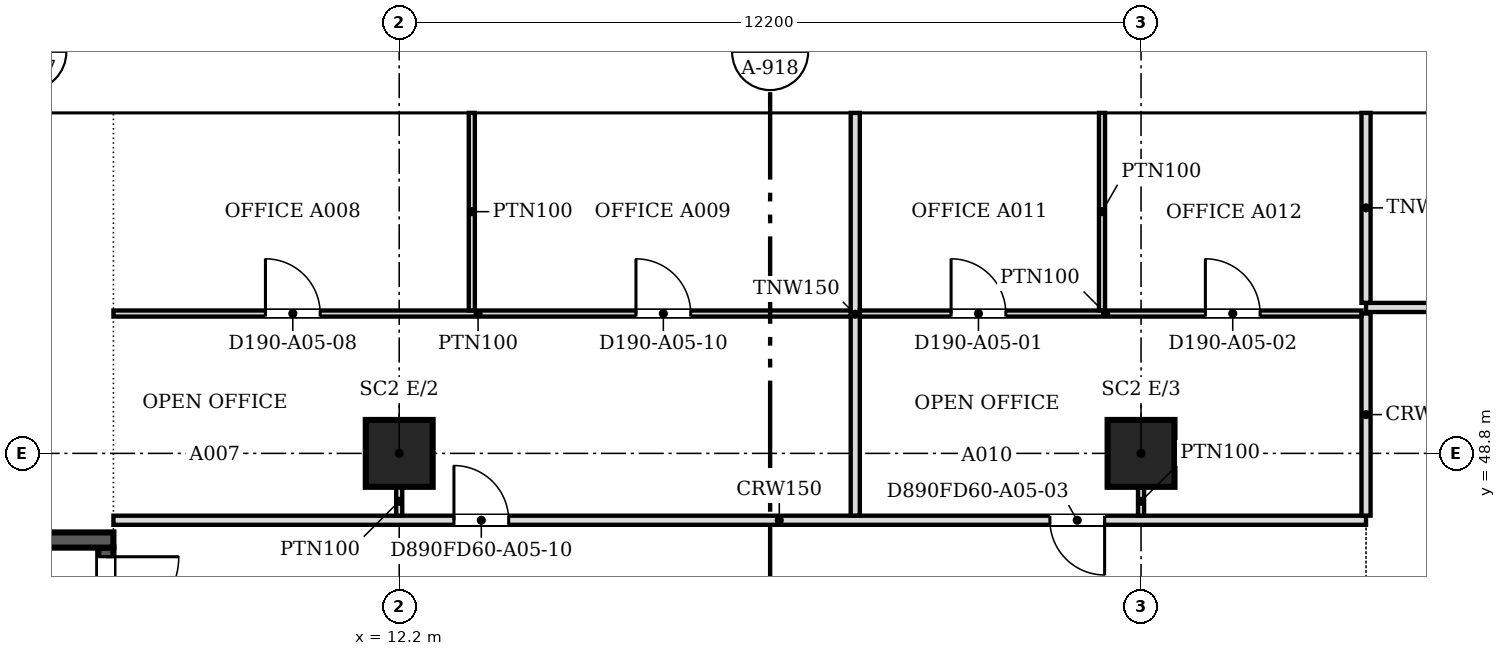
"""IFC4 building model, lengths in metres.
Left out: names, types, materials, properties, quantities, classifications, styles, units other than length and angle.
Written with IfcOpenShell. Run it as: python <this file> out.ifc"""

import sys

from ifc_helpers import new_model, si_unit, direction, frame, frame_2d, origin, origin_2d, place, context, subcontext, project, spatial, polyline, rectangle, outline, extrude, faceted_brep, source, transform, mapped, element, fill, save


model = new_model("IFC4")
c1 = context("Model", 3, precision=1e-05, world=origin(), true_north=direction((0.0, 1.0)))
c2 = subcontext(c1, "Body", "Model", "MODEL_VIEW")
j1 = project(units=[si_unit("LENGTHUNIT", "METRE"), si_unit("PLANEANGLEUNIT", "RADIAN")], contexts=[c1])
p1 = place(None, origin())
s1 = spatial("IfcSite", under=j1, at=p1, CompositionType="ELEMENT")
p2 = place(p1, origin())
s2 = spatial("IfcBuilding", under=s1, at=p2, CompositionType="ELEMENT")
p3 = place(p2, frame((0.0, 0.0, 56.2)))
s3 = spatial("IfcBuildingStorey", under=s2, at=p3, CompositionType="ELEMENT", Elevation=56.2)
for number, where, z_axis, x_axis in (
    (1, (12.2, 48.8, 0.0), (0.0, 0.0, 1.0), (1.0, 0.0, 0.0)),
    (2, (24.4, 48.8, 0.0), (0.0, 0.0, 1.0), (1.0, 0.0, 0.0)),
):
    element("IfcColumn", number, at=place(p3, frame(where, z_axis=z_axis, x_axis=x_axis)), inside=s3, PredefinedType="COLUMN", context=c2, shape_type="SweptSolid", body=[
        extrude(rectangle(XDim=1.1, YDim=1.1, at=origin_2d()), origin(), (0.0, 0.0, 1.0), 3.6),
    ])
m1 = source(origin(), c2, "Body", "SweptSolid", [
    extrude(outline(polyline([(3.05, 0.0), (6.1, 3.8), (3.05, 7.6), (0.0, 3.8), (3.05, 0.0)])), frame((0.0, 0.25, 0.0), z_axis=(0.0, -1.0, 0.0), x_axis=(1.0, 0.0, 0.0)), (0.0, 0.0, 1.0), 0.5),
])
p4 = place(p3, frame((33.55, 54.65, -3.8), z_axis=(0.0, 0.0, 1.0), x_axis=(-1.0, 0.0, 0.0)))
e3 = element("IfcWall", 3, at=p4, inside=s3, PredefinedType="SOLIDWALL", context=c2, shape_type="MappedRepresentation", body=[
    mapped(m1, transform((0.0, 0.0, 0.0), scale=1.0)),
])
m2 = source(origin(), c2, "Body", "SweptSolid", [
    extrude(outline(polyline([(3.05, 0.399), (5.78, 3.8), (3.05, 7.201), (0.321, 3.8), (3.05, 0.399)])), frame((0.0, 0.26, 0.0), z_axis=(0.0, -1.0, 0.0), x_axis=(1.0, 0.0, 0.0)), (0.0, 0.0, 1.0), 0.52),
])
p5 = place(p4, origin())
e4 = element("IfcOpeningElement", 4, at=p5, cuts=e3, PredefinedType="OPENING", context=c2, shape_type="MappedRepresentation", body=[
    mapped(m2, transform((0.0, 0.0, 0.0), scale=1.0)),
])
m3 = source(origin(), c2, "Body", "Brep", [
    faceted_brep([(3.05, -0.25, 0.0), (6.1, -0.25, 3.8), (6.1, -0.25, 3.8), (3.05, -0.25, 7.6), (0.0, -0.25, 3.8), (0.0, 0.25, 3.8), (3.05, 0.25, 7.6), (6.1, 0.25, 3.8), (6.1, 0.25, 3.8), (3.05, 0.25, 0.0)], [[[0, 1, 2, 3, 4]], [[5, 6, 7, 8, 9]], [[9, 8, 1, 0]], [[7, 6, 3, 2]], [[6, 5, 4, 3]], [[5, 9, 0, 4]], [[1, 8, 7, 2]]]),
])
p6 = place(p3, frame((27.45, 54.65, -3.8), z_axis=(0.0, 0.0, 1.0), x_axis=(-1.0, 0.0, 0.0)))
e5 = element("IfcWall", 5, at=p6, inside=s3, PredefinedType="SOLIDWALL", context=c2, shape_type="MappedRepresentation", body=[
    mapped(m3, transform((0.0, 0.0, 0.0), scale=1.0)),
])
p7 = place(p6, origin())
e6 = element("IfcOpeningElement", 6, at=p7, cuts=e5, PredefinedType="OPENING", context=c2, shape_type="MappedRepresentation", body=[
    mapped(m2, transform((0.0, 0.0, 0.0), scale=1.0)),
])
p8 = place(p3, frame((21.35, 54.65, -3.8), z_axis=(0.0, 0.0, 1.0), x_axis=(-1.0, 0.0, 0.0)))
e7 = element("IfcWall", 7, at=p8, inside=s3, PredefinedType="SOLIDWALL", context=c2, shape_type="MappedRepresentation", body=[
    mapped(m1, transform((0.0, 0.0, 0.0), scale=1.0)),
])
p9 = place(p8, origin())
e8 = element("IfcOpeningElement", 8, at=p9, cuts=e7, PredefinedType="OPENING", context=c2, shape_type="MappedRepresentation", body=[
    mapped(m2, transform((0.0, 0.0, 0.0), scale=1.0)),
])
p10 = place(p3, frame((15.25, 54.65, -3.8), z_axis=(0.0, 0.0, 1.0), x_axis=(-1.0, 0.0, 0.0)))
e9 = element("IfcWall", 9, at=p10, inside=s3, PredefinedType="SOLIDWALL", context=c2, shape_type="MappedRepresentation", body=[
    mapped(m1, transform((0.0, 0.0, 0.0), scale=1.0)),
])
p11 = place(p10, origin())
e10 = element("IfcOpeningElement", 10, at=p11, cuts=e9, PredefinedType="OPENING", context=c2, shape_type="MappedRepresentation", body=[
    mapped(m2, transform((0.0, 0.0, 0.0), scale=1.0)),
])
m4 = source(origin(), c2, "Body", "Brep", [
    faceted_brep([(3.003, -0.25, 0.0), (3.05, -0.25, 0.06), (3.05, -0.25, 7.54), (3.003, -0.25, 7.6), (0.0, -0.25, 3.8), (0.0, 0.25, 3.8), (2.957, 0.25, 7.541), (2.957, 0.25, 0.059), (3.003, 0.0, 0.0), (3.003, 0.0, 7.6)], [[[0, 1, 2, 3, 4]], [[5, 6, 7]], [[1, 0, 8]], [[9, 3, 2]], [[6, 5, 4, 3, 9]], [[5, 7, 8, 0, 4]], [[1, 8, 7, 6, 9, 2]]]),
])
p12 = place(p3, frame((9.15, 54.65, -3.8), z_axis=(0.0, 0.0, 1.0), x_axis=(-1.0, 0.0, 0.0)))
e11 = element("IfcWall", 11, at=p12, inside=s3, PredefinedType="SOLIDWALL", context=c2, shape_type="MappedRepresentation", body=[
    mapped(m4, transform((0.0, 0.0, 0.0), scale=1.0)),
])
m5 = source(origin(), c2, "Body", "SweptSolid", [
    extrude(outline(polyline([(2.803, 6.944), (0.319, 3.8), (2.803, 0.656), (2.803, 6.944)])), frame((0.0, 0.26, 0.0), z_axis=(0.0, -1.0, 0.0), x_axis=(1.0, 0.0, 0.0)), (0.0, 0.0, 1.0), 0.52),
])
p13 = place(p12, origin())
e12 = element("IfcOpeningElement", 12, at=p13, cuts=e11, PredefinedType="OPENING", context=c2, shape_type="MappedRepresentation", body=[
    mapped(m5, transform((0.0, 0.0, 0.0), scale=1.0)),
])
p14 = place(p2, frame((0.0, 0.0, 60.0)))
s4 = spatial("IfcBuildingStorey", under=s2, at=p14, CompositionType="ELEMENT", Elevation=60.0)
p15 = place(p14, frame((30.5, 54.65, -3.8), z_axis=(0.0, 0.0, 1.0), x_axis=(-1.0, 0.0, 0.0)))
e13 = element("IfcWall", 13, at=p15, inside=s4, PredefinedType="SOLIDWALL", context=c2, shape_type="MappedRepresentation", body=[
    mapped(m1, transform((0.0, 0.0, 0.0), scale=1.0)),
])
p16 = place(p15, origin())
e14 = element("IfcOpeningElement", 14, at=p16, cuts=e13, PredefinedType="OPENING", context=c2, shape_type="MappedRepresentation", body=[
    mapped(m2, transform((0.0, 0.0, 0.0), scale=1.0)),
])
p17 = place(p14, frame((24.4, 54.65, -3.8), z_axis=(0.0, 0.0, 1.0), x_axis=(-1.0, 0.0, 0.0)))
e15 = element("IfcWall", 15, at=p17, inside=s4, PredefinedType="SOLIDWALL", context=c2, shape_type="MappedRepresentation", body=[
    mapped(m3, transform((0.0, 0.0, 0.0), scale=1.0)),
])
p18 = place(p17, origin())
e16 = element("IfcOpeningElement", 16, at=p18, cuts=e15, PredefinedType="OPENING", context=c2, shape_type="MappedRepresentation", body=[
    mapped(m2, transform((0.0, 0.0, 0.0), scale=1.0)),
])
p19 = place(p14, frame((18.3, 54.65, -3.8), z_axis=(0.0, 0.0, 1.0), x_axis=(-1.0, 0.0, 0.0)))
e17 = element("IfcWall", 17, at=p19, inside=s4, PredefinedType="SOLIDWALL", context=c2, shape_type="MappedRepresentation", body=[
    mapped(m1, transform((0.0, 0.0, 0.0), scale=1.0)),
])
p20 = place(p19, origin())
e18 = element("IfcOpeningElement", 18, at=p20, cuts=e17, PredefinedType="OPENING", context=c2, shape_type="MappedRepresentation", body=[
    mapped(m2, transform((0.0, 0.0, 0.0), scale=1.0)),
])
m6 = source(origin(), c2, "Body", "Brep", [
    faceted_brep([(3.05, -0.25, 0.0), (6.053, -0.25, 3.8), (3.05, -0.25, 7.6), (0.0, -0.25, 3.8), (0.0, 0.25, 3.8), (3.05, 0.25, 7.6), (6.007, 0.25, 3.859), (6.007, 0.25, 3.741), (3.05, 0.25, 0.0), (6.053, 0.0, 3.8)], [[[0, 1, 2, 3]], [[4, 5, 6, 7, 8]], [[8, 7, 9, 1, 0]], [[6, 5, 2, 1, 9]], [[5, 4, 3, 2]], [[4, 8, 0, 3]], [[9, 7, 6]]]),
])
p21 = place(p14, frame((12.2, 54.65, -3.8), z_axis=(0.0, 0.0, 1.0), x_axis=(-1.0, 0.0, 0.0)))
e19 = element("IfcWall", 19, at=p21, inside=s4, PredefinedType="SOLIDWALL", context=c2, shape_type="MappedRepresentation", body=[
    mapped(m6, transform((0.0, 0.0, 0.0), scale=1.0)),
])
m7 = source(origin(), c2, "Body", "SweptSolid", [
    extrude(outline(polyline([(3.049, 0.401), (5.735, 3.8), (3.049, 7.199), (0.321, 3.8), (3.049, 0.401)])), frame((0.0, 0.26, 0.0), z_axis=(0.0, -1.0, 0.0), x_axis=(1.0, 0.0, 0.0)), (0.0, 0.0, 1.0), 0.52),
])
p22 = place(p21, origin())
e20 = element("IfcOpeningElement", 20, at=p22, cuts=e19, PredefinedType="OPENING", context=c2, shape_type="MappedRepresentation", body=[
    mapped(m7, transform((0.0, 0.0, 0.0), scale=1.0)),
])
p23 = place(p3, frame((3.6, 47.375, 0.0), z_axis=(0.0, 0.0, 1.0), x_axis=(1.0, 0.0, 0.0)))
e21 = element("IfcWall", 21, at=p23, inside=s3, PredefinedType="SOLIDWALL", context=c2, shape_type="SweptSolid", body=[
    extrude(rectangle(XDim=3.9, YDim=0.25, at=frame_2d((1.95, 0.0))), origin(), (0.0, 0.0, 1.0), 3.8),
])
p24 = place(p3, frame((7.375, 47.25, 0.0), z_axis=(0.0, 0.0, 1.0), x_axis=(0.0, -1.0, 0.0)))
e22 = element("IfcWall", 22, at=p24, inside=s3, PredefinedType="SOLIDWALL", context=c2, shape_type="SweptSolid", body=[
    extrude(rectangle(XDim=8.0, YDim=0.25, at=frame_2d((4.0, 0.0))), origin(), (0.0, 0.0, 1.0), 3.8),
])
m8 = source(origin(), c2, "Body", "SweptSolid", [
    extrude(rectangle(XDim=1.2, YDim=2.1, at=frame_2d((0.6, 1.05))), frame((0.0, 0.135, 0.0), z_axis=(0.0, -1.0, 0.0), x_axis=(1.0, 0.0, 0.0)), (0.0, 0.0, 1.0), 0.27),
])
p25 = place(p24, frame((0.15, 0.0, 0.0)))
e23 = element("IfcOpeningElement", 23, at=p25, cuts=e22, PredefinedType="OPENING", context=c2, shape_type="MappedRepresentation", body=[
    mapped(m8, transform((0.0, 0.0, 0.0), scale=1.0)),
])
p26 = place(p3, frame((7.5, 47.7, 0.0), z_axis=(0.0, 0.0, 1.0), x_axis=(1.0, 0.0, 0.0)))
e24 = element("IfcWall", 24, at=p26, inside=s3, PredefinedType="PARTITIONING", context=c2, shape_type="SweptSolid", body=[
    extrude(rectangle(XDim=20.6, YDim=0.15, at=frame_2d((10.3, 0.0))), origin(), (0.0, 0.0, 1.0), 3.067),
])
m9 = source(origin(), c2, "Body", "SweptSolid", [
    extrude(rectangle(XDim=0.9, YDim=2.1, at=frame_2d((0.45, 1.05))), frame((0.0, 0.085, 0.0), z_axis=(0.0, -1.0, 0.0), x_axis=(1.0, 0.0, 0.0)), (0.0, 0.0, 1.0), 0.17),
])
p27 = place(p26, frame((15.401, 0.0, 0.0)))
e25 = element("IfcOpeningElement", 25, at=p27, cuts=e24, PredefinedType="OPENING", context=c2, shape_type="MappedRepresentation", body=[
    mapped(m9, transform((0.0, 0.0, 0.0), scale=1.0)),
])
p28 = place(p26, frame((5.6, 0.0, 0.0)))
e26 = element("IfcOpeningElement", 26, at=p28, cuts=e24, PredefinedType="OPENING", context=c2, shape_type="MappedRepresentation", body=[
    mapped(m9, transform((0.0, 0.0, 0.0), scale=1.0)),
])
p29 = place(p3, frame((19.7, 47.776, 0.0), z_axis=(0.0, 0.0, 1.0), x_axis=(0.0, 1.0, 0.0)))
e27 = element("IfcWall", 27, at=p29, inside=s3, PredefinedType="PARTITIONING", context=c2, shape_type="SweptSolid", body=[
    extrude(rectangle(XDim=6.624, YDim=0.15, at=frame_2d((3.312, 0.0))), origin(), (0.0, 0.0, 1.0), 3.067),
])
p30 = place(p3, frame((28.1, 47.776, 0.0), z_axis=(0.0, 0.0, 1.0), x_axis=(0.0, 1.0, 0.0)))
e28 = element("IfcWall", 28, at=p30, inside=s3, PredefinedType="PARTITIONING", context=c2, shape_type="SweptSolid", body=[
    extrude(rectangle(XDim=3.324, YDim=0.15, at=frame_2d((1.662, 0.0))), origin(), (0.0, 0.0, 1.0), 3.067),
])
for number, where, z_axis, x_axis in (
    (29, (12.2, 48.25, 0.0), (0.0, 0.0, 1.0), (0.0, -1.0, 0.0)),
    (30, (24.4, 48.25, 0.0), (0.0, 0.0, 1.0), (0.0, -1.0, 0.0)),
):
    element("IfcWall", number, at=place(p3, frame(where, z_axis=z_axis, x_axis=x_axis)), inside=s3, PredefinedType="PARTITIONING", context=c2, shape_type="SweptSolid", body=[
        extrude(rectangle(XDim=0.475, YDim=0.1, at=frame_2d((0.238, 0.0))), origin(), (0.0, 0.0, 1.0), 3.067),
    ])
p31 = place(p3, frame((7.5, 51.1, 0.0), z_axis=(0.0, 0.0, 1.0), x_axis=(1.0, 0.0, 0.0)))
e31 = element("IfcWall", 31, at=p31, inside=s3, PredefinedType="PARTITIONING", context=c2, shape_type="SweptSolid", body=[
    extrude(rectangle(XDim=12.124, YDim=0.1, at=frame_2d((6.062, 0.0))), origin(), (0.0, 0.0, 1.0), 3.067),
])
m10 = source(origin(), c2, "Body", "SweptSolid", [
    extrude(rectangle(XDim=0.9, YDim=2.1, at=frame_2d((0.45, 1.05))), frame((0.0, 0.06, 0.0), z_axis=(0.0, -1.0, 0.0), x_axis=(1.0, 0.0, 0.0)), (0.0, 0.0, 1.0), 0.12),
])
p32 = place(p31, frame((2.5, 0.0, 0.0)))
e32 = element("IfcOpeningElement", 32, at=p32, cuts=e31, PredefinedType="OPENING", context=c2, shape_type="MappedRepresentation", body=[
    mapped(m10, transform((0.0, 0.0, 0.0), scale=1.0)),
])
p33 = place(p31, frame((8.594, 0.0, 0.0)))
e33 = element("IfcOpeningElement", 33, at=p33, cuts=e31, PredefinedType="OPENING", context=c2, shape_type="MappedRepresentation", body=[
    mapped(m10, transform((0.0, 0.0, 0.0), scale=1.0)),
])
p34 = place(p3, frame((19.776, 51.1, 0.0), z_axis=(0.0, 0.0, 1.0), x_axis=(1.0, 0.0, 0.0)))
e34 = element("IfcWall", 34, at=p34, inside=s3, PredefinedType="PARTITIONING", context=c2, shape_type="SweptSolid", body=[
    extrude(rectangle(XDim=8.248, YDim=0.1, at=frame_2d((4.124, 0.0))), origin(), (0.0, 0.0, 1.0), 3.067),
])
p35 = place(p34, frame((1.5, 0.0, 0.0)))
e35 = element("IfcOpeningElement", 35, at=p35, cuts=e34, PredefinedType="OPENING", context=c2, shape_type="MappedRepresentation", body=[
    mapped(m10, transform((0.0, 0.0, 0.0), scale=1.0)),
])
p36 = place(p34, frame((5.682, 0.0, 0.0)))
e36 = element("IfcOpeningElement", 36, at=p36, cuts=e34, PredefinedType="OPENING", context=c2, shape_type="MappedRepresentation", body=[
    mapped(m10, transform((0.0, 0.0, 0.0), scale=1.0)),
])
for number, where, z_axis, x_axis in (
    (37, (13.394, 51.151, 0.0), (0.0, 0.0, 1.0), (0.0, 1.0, 0.0)),
    (38, (23.758, 51.151, 0.0), (0.0, 0.0, 1.0), (0.0, 1.0, 0.0)),
):
    element("IfcWall", number, at=place(p3, frame(where, z_axis=z_axis, x_axis=x_axis)), inside=s3, PredefinedType="PARTITIONING", context=c2, shape_type="SweptSolid", body=[
        extrude(rectangle(XDim=3.249, YDim=0.1, at=frame_2d((1.625, 0.0))), origin(), (0.0, 0.0, 1.0), 3.067),
    ])
p37 = place(p3, frame((28.1, 51.2, 0.0), z_axis=(0.0, 0.0, 1.0), x_axis=(1.0, 0.0, 0.0)))
e39 = element("IfcWall", 39, at=p37, inside=s3, PredefinedType="PARTITIONING", context=c2, shape_type="SweptSolid", body=[
    extrude(rectangle(XDim=31.438, YDim=0.15, at=frame_2d((15.719, 0.0))), origin(), (0.0, 0.0, 1.0), 3.067),
])
p38 = place(p37, frame((16.301, 0.0, 0.0)))
e40 = element("IfcOpeningElement", 40, at=p38, cuts=e39, PredefinedType="OPENING", context=c2, shape_type="MappedRepresentation", body=[
    mapped(m9, transform((0.0, 0.0, 0.0), scale=1.0)),
])
p39 = place(p37, frame((25.95, 0.0, 0.0)))
e41 = element("IfcOpeningElement", 41, at=p39, cuts=e39, PredefinedType="OPENING", context=c2, shape_type="MappedRepresentation", body=[
    mapped(m9, transform((0.0, 0.0, 0.0), scale=1.0)),
])
p40 = place(p37, frame((5.6, 0.0, 0.0)))
e42 = element("IfcOpeningElement", 42, at=p40, cuts=e39, PredefinedType="OPENING", context=c2, shape_type="MappedRepresentation", body=[
    mapped(m9, transform((0.0, 0.0, 0.0), scale=1.0)),
])
p41 = place(p3, frame((28.1, 51.276, 0.0), z_axis=(0.0, 0.0, 1.0), x_axis=(0.0, 1.0, 0.0)))
e43 = element("IfcWall", 43, at=p41, inside=s3, PredefinedType="PARTITIONING", context=c2, shape_type="SweptSolid", body=[
    extrude(rectangle(XDim=3.124, YDim=0.15, at=frame_2d((1.562, 0.0))), origin(), (0.0, 0.0, 1.0), 3.067),
])
m11 = source(origin(), c2, "Body", "SweptSolid", [
    extrude(rectangle(XDim=1.2, YDim=2.1, at=frame_2d((0.6, 1.05))), frame((0.0, 0.025, 0.0), z_axis=(0.0, -1.0, 0.0), x_axis=(1.0, 0.0, 0.0)), (0.0, 0.0, 1.0), 0.05),
])
p42 = place(p25, origin())
e44 = element("IfcDoor", 44, at=p42, inside=s3, OperationType="SINGLE_SWING_LEFT", PredefinedType="DOOR", context=c2, shape_type="MappedRepresentation", body=[
    mapped(m11, transform((0.0, 0.0, 0.0), scale=1.0)),
])
fill(e23, e44)
m12 = source(origin(), c2, "Body", "SweptSolid", [
    extrude(rectangle(XDim=0.9, YDim=2.1, at=frame_2d((0.45, 1.05))), frame((0.0, 0.025, 0.0), z_axis=(0.0, -1.0, 0.0), x_axis=(1.0, 0.0, 0.0)), (0.0, 0.0, 1.0), 0.05),
])
p43 = place(p35, origin())
e45 = element("IfcDoor", 45, at=p43, inside=s3, OperationType="SINGLE_SWING_LEFT", PredefinedType="DOOR", context=c2, shape_type="MappedRepresentation", body=[
    mapped(m12, transform((0.0, 0.0, 0.0), scale=1.0)),
])
fill(e35, e45)
p44 = place(p36, origin())
e46 = element("IfcDoor", 46, at=p44, inside=s3, OperationType="SINGLE_SWING_LEFT", PredefinedType="DOOR", context=c2, shape_type="MappedRepresentation", body=[
    mapped(m12, transform((0.0, 0.0, 0.0), scale=1.0)),
])
fill(e36, e46)
p45 = place(p32, origin())
e47 = element("IfcDoor", 47, at=p45, inside=s3, OperationType="SINGLE_SWING_LEFT", PredefinedType="DOOR", context=c2, shape_type="MappedRepresentation", body=[
    mapped(m12, transform((0.0, 0.0, 0.0), scale=1.0)),
])
fill(e32, e47)
p46 = place(p33, origin())
e48 = element("IfcDoor", 48, at=p46, inside=s3, OperationType="SINGLE_SWING_LEFT", PredefinedType="DOOR", context=c2, shape_type="MappedRepresentation", body=[
    mapped(m12, transform((0.0, 0.0, 0.0), scale=1.0)),
])
fill(e33, e48)
p47 = place(p27, origin())
e49 = element("IfcDoor", 49, at=p47, inside=s3, OperationType="SINGLE_SWING_RIGHT", PredefinedType="DOOR", context=c2, shape_type="MappedRepresentation", body=[
    mapped(m12, transform((0.0, 0.0, 0.0), scale=1.0)),
])
fill(e25, e49)
p48 = place(p28, origin())
e50 = element("IfcDoor", 50, at=p48, inside=s3, OperationType="SINGLE_SWING_LEFT", PredefinedType="DOOR", context=c2, shape_type="MappedRepresentation", body=[
    mapped(m12, transform((0.0, 0.0, 0.0), scale=1.0)),
])
fill(e26, e50)
save(model, sys.argv[1])
